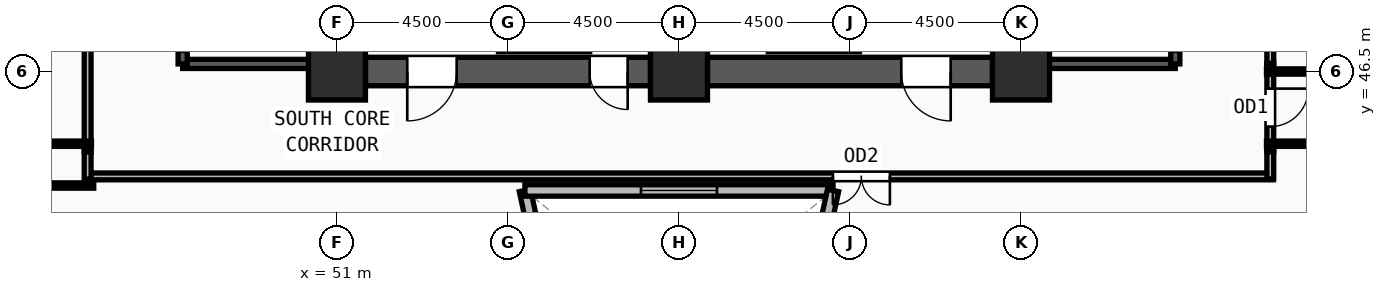
"""IFC4 building model, lengths in metres.
Left out: names, types, materials, properties, quantities, classifications, styles, units other than length and angle.
Written with IfcOpenShell. Run it as: python <this file> out.ifc"""

import sys

from ifc_helpers import new_model, si_unit, direction, frame, frame_2d, origin, origin_2d, place, context, subcontext, project, spatial, rectangle, extrude, source, transform, mapped, element, fill, save


model = new_model("IFC4")
c1 = context("Model", 3, precision=1e-05, world=origin(), true_north=direction((0.0, 1.0)))
c2 = subcontext(c1, "Body", "Model", "MODEL_VIEW")
j1 = project(units=[si_unit("LENGTHUNIT", "METRE"), si_unit("PLANEANGLEUNIT", "RADIAN")], contexts=[c1])
p1 = place(None, origin())
s1 = spatial("IfcSite", under=j1, at=p1, CompositionType="ELEMENT")
p2 = place(p1, origin())
s2 = spatial("IfcBuilding", under=s1, at=p2, CompositionType="ELEMENT")
p3 = place(p2, frame((0.0, 0.0, 135.75)))
s3 = spatial("IfcBuildingStorey", under=s2, at=p3, CompositionType="ELEMENT", Elevation=135.75)
m1 = source(origin(), c2, "Body", "SweptSolid", [
    extrude(rectangle(XDim=1.5, YDim=1.5, at=origin_2d()), origin(), (0.0, 0.0, 1.0), 3.75),
])
for number, where, z_axis, x_axis in (
    (1, (51.0, 46.5, 0.0), (0.0, 0.0, 1.0), (1.0, 0.0, 0.0)),
    (2, (60.0, 46.5, 0.0), (0.0, 0.0, 1.0), (1.0, 0.0, 0.0)),
    (3, (69.0, 46.5, 0.0), (0.0, 0.0, 1.0), (1.0, 0.0, 0.0)),
):
    element("IfcColumn", number, at=place(p3, frame(where, z_axis=z_axis, x_axis=x_axis)), inside=s3, PredefinedType="COLUMN", context=c2, shape_type="MappedRepresentation", body=[
        mapped(m1, transform((0.0, 0.0, 0.0), x_axis=(1.0, 0.0, 0.0), y_axis=(0.0, 1.0, 0.0), z_axis=(0.0, 0.0, 1.0), scale=1.0)),
    ])
p4 = place(p3, frame((66.25, 16.593, 0.0), z_axis=(0.0, 0.0, 1.0), x_axis=(0.550080155958, 0.835111861981, 0.0)))
e4 = element("IfcWall", 4, at=p4, inside=s3, PredefinedType="SOLIDWALL", context=c2, shape_type="SweptSolid", body=[
    extrude(rectangle(XDim=31.386, YDim=0.42, at=frame_2d((15.693, 0.0))), origin(), (0.0, 0.0, 1.0), 3.47),
])
m2 = source(origin(), c2, "Body", "SweptSolid", [
    extrude(rectangle(XDim=1.65, YDim=1.95, at=frame_2d((0.825, 0.975))), frame((0.0, 0.22, 0.0), z_axis=(0.0, -1.0, 0.0), x_axis=(1.0, 0.0, 0.0)), (0.0, 0.0, 1.0), 0.44),
])
p5 = place(p4, frame((7.022, 0.0, 0.55)))
e5 = element("IfcOpeningElement", 5, at=p5, cuts=e4, PredefinedType="OPENING", context=c2, shape_type="MappedRepresentation", body=[
    mapped(m2, transform((0.0, 0.0, 0.0), x_axis=(1.0, 0.0, 0.0), y_axis=(0.0, 1.0, 0.0), z_axis=(0.0, 0.0, 1.0), scale=1.0)),
])
p6 = place(p4, frame((14.868, 0.0, 0.55)))
e6 = element("IfcOpeningElement", 6, at=p6, cuts=e4, PredefinedType="OPENING", context=c2, shape_type="MappedRepresentation", body=[
    mapped(m2, transform((0.0, 0.0, 0.0), x_axis=(1.0, 0.0, 0.0), y_axis=(0.0, 1.0, 0.0), z_axis=(0.0, 0.0, 1.0), scale=1.0)),
])
p7 = place(p4, frame((22.715, 0.0, 0.55)))
e7 = element("IfcOpeningElement", 7, at=p7, cuts=e4, PredefinedType="OPENING", context=c2, shape_type="MappedRepresentation", body=[
    mapped(m2, transform((0.0, 0.0, 0.0), x_axis=(1.0, 0.0, 0.0), y_axis=(0.0, 1.0, 0.0), z_axis=(0.0, 0.0, 1.0), scale=1.0)),
])
p8 = place(p3, frame((68.25, 46.5, 0.0), z_axis=(0.0, 0.0, 1.0), x_axis=(-1.0, 0.0, 0.0)))
e8 = element("IfcWall", 8, at=p8, inside=s3, PredefinedType="SHEAR", context=c2, shape_type="SweptSolid", body=[
    extrude(rectangle(XDim=7.5, YDim=0.75, at=frame_2d((3.75, 0.0))), origin(), (0.0, 0.0, 1.0), 3.47),
])
m3 = source(origin(), c2, "Body", "SweptSolid", [
    extrude(rectangle(XDim=1.3, YDim=2.2, at=frame_2d((0.65, 1.1))), frame((0.0, 0.385, 0.0), z_axis=(0.0, -1.0, 0.0), x_axis=(1.0, 0.0, 0.0)), (0.0, 0.0, 1.0), 0.77),
])
p9 = place(p8, frame((1.1, 0.0, 0.0)))
e9 = element("IfcOpeningElement", 9, at=p9, cuts=e8, PredefinedType="OPENING", context=c2, shape_type="MappedRepresentation", body=[
    mapped(m3, transform((0.0, 0.0, 0.0), x_axis=(1.0, 0.0, 0.0), y_axis=(0.0, 1.0, 0.0), z_axis=(0.0, 0.0, 1.0), scale=1.0)),
])
p10 = place(p3, frame((59.25, 46.5, 0.0), z_axis=(0.0, 0.0, 1.0), x_axis=(-1.0, 0.0, 0.0)))
e10 = element("IfcWall", 10, at=p10, inside=s3, PredefinedType="SHEAR", context=c2, shape_type="SweptSolid", body=[
    extrude(rectangle(XDim=7.5, YDim=0.75, at=frame_2d((3.75, 0.0))), origin(), (0.0, 0.0, 1.0), 3.47),
])
p11 = place(p10, frame((5.1, 0.0, 0.0)))
e11 = element("IfcOpeningElement", 11, at=p11, cuts=e10, PredefinedType="OPENING", context=c2, shape_type="MappedRepresentation", body=[
    mapped(m3, transform((0.0, 0.0, 0.0), x_axis=(1.0, 0.0, 0.0), y_axis=(0.0, 1.0, 0.0), z_axis=(0.0, 0.0, 1.0), scale=1.0)),
])
m4 = source(origin(), c2, "Body", "SweptSolid", [
    extrude(rectangle(XDim=1.0, YDim=2.2, at=frame_2d((0.5, 1.1))), frame((0.0, 0.385, 0.0), z_axis=(0.0, -1.0, 0.0), x_axis=(1.0, 0.0, 0.0)), (0.0, 0.0, 1.0), 0.77),
])
p12 = place(p10, frame((0.6, 0.0, 0.0)))
e12 = element("IfcOpeningElement", 12, at=p12, cuts=e10, PredefinedType="OPENING", context=c2, shape_type="MappedRepresentation", body=[
    mapped(m4, transform((0.0, 0.0, 0.0), x_axis=(1.0, 0.0, 0.0), y_axis=(0.0, 1.0, 0.0), z_axis=(0.0, 0.0, 1.0), scale=1.0)),
])
p13 = place(p3, frame((46.94, 46.7, 0.0), z_axis=(0.0, 0.0, 1.0), x_axis=(1.0, 0.0, 0.0)))
e13 = element("IfcWall", 13, at=p13, inside=s3, PredefinedType="SOLIDWALL", context=c2, shape_type="SweptSolid", body=[
    extrude(rectangle(XDim=3.44, YDim=0.24, at=frame_2d((1.72, 0.0))), origin(), (0.0, 0.0, 1.0), 3.47),
])
p14 = place(p3, frame((50.38, 46.7, 0.0), z_axis=(0.0, 0.0, 1.0), x_axis=(0.0, 1.0, 0.0)))
e14 = element("IfcWall", 14, at=p14, inside=s3, PredefinedType="SOLIDWALL", context=c2, shape_type="SweptSolid", body=[
    extrude(rectangle(XDim=7.82, YDim=0.24, at=frame_2d((3.91, 0.0))), origin(), (0.0, 0.0, 1.0), 3.47),
])
p15 = place(p3, frame((46.94, 54.52, 0.0), z_axis=(0.0, 0.0, 1.0), x_axis=(0.0, -1.0, 0.0)))
e15 = element("IfcWall", 15, at=p15, inside=s3, PredefinedType="SOLIDWALL", context=c2, shape_type="SweptSolid", body=[
    extrude(rectangle(XDim=7.82, YDim=0.24, at=frame_2d((3.91, 0.0))), origin(), (0.0, 0.0, 1.0), 3.47),
])
m5 = source(origin(), c2, "Body", "SweptSolid", [
    extrude(rectangle(XDim=1.2, YDim=2.2, at=frame_2d((0.6, 1.1))), frame((0.0, 0.13, 0.0), z_axis=(0.0, -1.0, 0.0), x_axis=(1.0, 0.0, 0.0)), (0.0, 0.0, 1.0), 0.26),
])
p16 = place(p15, frame((6.3, 0.0, 0.0)))
e16 = element("IfcOpeningElement", 16, at=p16, cuts=e15, PredefinedType="OPENING", context=c2, shape_type="MappedRepresentation", body=[
    mapped(m5, transform((0.0, 0.0, 0.0), x_axis=(1.0, 0.0, 0.0), y_axis=(0.0, 1.0, 0.0), z_axis=(0.0, 0.0, 1.0), scale=1.0)),
])
p17 = place(p3, frame((69.62, 46.7, 0.0), z_axis=(0.0, 0.0, 1.0), x_axis=(1.0, 0.0, 0.0)))
e17 = element("IfcWall", 17, at=p17, inside=s3, PredefinedType="SOLIDWALL", context=c2, shape_type="SweptSolid", body=[
    extrude(rectangle(XDim=3.44, YDim=0.24, at=frame_2d((1.72, 0.0))), origin(), (0.0, 0.0, 1.0), 3.47),
])
p18 = place(p3, frame((73.06, 46.7, 0.0), z_axis=(0.0, 0.0, 1.0), x_axis=(0.0, 1.0, 0.0)))
e18 = element("IfcWall", 18, at=p18, inside=s3, PredefinedType="SOLIDWALL", context=c2, shape_type="SweptSolid", body=[
    extrude(rectangle(XDim=7.82, YDim=0.24, at=frame_2d((3.91, 0.0))), origin(), (0.0, 0.0, 1.0), 3.47),
])
p19 = place(p18, frame((0.32, 0.0, 0.0)))
e19 = element("IfcOpeningElement", 19, at=p19, cuts=e18, PredefinedType="OPENING", context=c2, shape_type="MappedRepresentation", body=[
    mapped(m5, transform((0.0, 0.0, 0.0), x_axis=(1.0, 0.0, 0.0), y_axis=(0.0, 1.0, 0.0), z_axis=(0.0, 0.0, 1.0), scale=1.0)),
])
p20 = place(p3, frame((69.62, 54.52, 0.0), z_axis=(0.0, 0.0, 1.0), x_axis=(0.0, -1.0, 0.0)))
e20 = element("IfcWall", 20, at=p20, inside=s3, PredefinedType="SOLIDWALL", context=c2, shape_type="SweptSolid", body=[
    extrude(rectangle(XDim=7.82, YDim=0.24, at=frame_2d((3.91, 0.0))), origin(), (0.0, 0.0, 1.0), 3.47),
])
p21 = place(p3, frame((57.365, 36.808, 0.0), z_axis=(0.0, 0.0, 1.0), x_axis=(-0.211351571183, 0.977410105001, 0.0)))
e21 = element("IfcWall", 21, at=p21, inside=s3, PredefinedType="SOLIDWALL", context=c2, shape_type="SweptSolid", body=[
    extrude(rectangle(XDim=6.714, YDim=0.3, at=frame_2d((3.357, 0.0))), origin(), (0.0, 0.0, 1.0), 3.47),
])
m6 = source(origin(), c2, "Body", "SweptSolid", [
    extrude(rectangle(XDim=2.0, YDim=1.9, at=frame_2d((1.0, 0.95))), frame((0.0, 0.16, 0.0), z_axis=(0.0, -1.0, 0.0), x_axis=(1.0, 0.0, 0.0)), (0.0, 0.0, 1.0), 0.32),
])
p22 = place(p21, frame((2.357, 0.0, 0.55)))
e22 = element("IfcOpeningElement", 22, at=p22, cuts=e21, PredefinedType="OPENING", context=c2, shape_type="MappedRepresentation", body=[
    mapped(m6, transform((0.0, 0.0, 0.0), x_axis=(1.0, 0.0, 0.0), y_axis=(0.0, 1.0, 0.0), z_axis=(0.0, 0.0, 1.0), scale=1.0)),
])
p23 = place(p3, frame((55.946, 43.37, 0.0), z_axis=(0.0, 0.0, 1.0), x_axis=(1.0, 0.0, 0.0)))
e23 = element("IfcWall", 23, at=p23, inside=s3, PredefinedType="SOLIDWALL", context=c2, shape_type="SweptSolid", body=[
    extrude(rectangle(XDim=8.108, YDim=0.3, at=frame_2d((4.054, 0.0))), origin(), (0.0, 0.0, 1.0), 3.47),
])
p24 = place(p23, frame((3.054, 0.0, 0.55)))
e24 = element("IfcOpeningElement", 24, at=p24, cuts=e23, PredefinedType="OPENING", context=c2, shape_type="MappedRepresentation", body=[
    mapped(m6, transform((0.0, 0.0, 0.0), x_axis=(1.0, 0.0, 0.0), y_axis=(0.0, 1.0, 0.0), z_axis=(0.0, 0.0, 1.0), scale=1.0)),
])
p25 = place(p3, frame((64.054, 43.37, 0.0), z_axis=(0.0, 0.0, 1.0), x_axis=(-0.211351571183, -0.977410105001, 0.0)))
e25 = element("IfcWall", 25, at=p25, inside=s3, PredefinedType="SOLIDWALL", context=c2, shape_type="SweptSolid", body=[
    extrude(rectangle(XDim=6.714, YDim=0.3, at=frame_2d((3.357, 0.0))), origin(), (0.0, 0.0, 1.0), 3.47),
])
p26 = place(p25, frame((2.357, 0.0, 0.55)))
e26 = element("IfcOpeningElement", 26, at=p26, cuts=e25, PredefinedType="OPENING", context=c2, shape_type="MappedRepresentation", body=[
    mapped(m6, transform((0.0, 0.0, 0.0), x_axis=(1.0, 0.0, 0.0), y_axis=(0.0, 1.0, 0.0), z_axis=(0.0, 0.0, 1.0), scale=1.0)),
])
p27 = place(p3, frame((44.44, 44.385, 0.0), z_axis=(0.0, 0.0, 1.0), x_axis=(0.0, 1.0, 0.0)))
e27 = element("IfcWall", 27, at=p27, inside=s3, PredefinedType="PARTITIONING", context=c2, shape_type="SweptSolid", body=[
    extrude(rectangle(XDim=6.83, YDim=0.18, at=frame_2d((3.415, 0.0))), origin(), (0.0, 0.0, 1.0), 3.47),
])
m7 = source(origin(), c2, "Body", "SweptSolid", [
    extrude(rectangle(XDim=1.0, YDim=2.2, at=frame_2d((0.5, 1.1))), frame((0.0, 0.1, 0.0), z_axis=(0.0, -1.0, 0.0), x_axis=(1.0, 0.0, 0.0)), (0.0, 0.0, 1.0), 0.2),
])
p28 = place(p27, frame((2.915, 0.0, 0.0)))
e28 = element("IfcOpeningElement", 28, at=p28, cuts=e27, PredefinedType="OPENING", context=c2, shape_type="MappedRepresentation", body=[
    mapped(m7, transform((0.0, 0.0, 0.0), x_axis=(1.0, 0.0, 0.0), y_axis=(0.0, 1.0, 0.0), z_axis=(0.0, 0.0, 1.0), scale=1.0)),
])
p29 = place(p3, frame((75.63, 43.74, 0.0), z_axis=(0.0, 0.0, 1.0), x_axis=(-1.0, 0.0, 0.0)))
e29 = element("IfcWall", 29, at=p29, inside=s3, PredefinedType="PARTITIONING", context=c2, shape_type="SweptSolid", body=[
    extrude(rectangle(XDim=31.26, YDim=0.18, at=frame_2d((15.63, 0.0))), origin(), (0.0, 0.0, 1.0), 3.47),
])
m8 = source(origin(), c2, "Body", "SweptSolid", [
    extrude(rectangle(XDim=1.5, YDim=2.2, at=frame_2d((0.75, 1.1))), frame((0.0, 0.1, 0.0), z_axis=(0.0, -1.0, 0.0), x_axis=(1.0, 0.0, 0.0)), (0.0, 0.0, 1.0), 0.2),
])
p30 = place(p29, frame((10.08, 0.0, 0.0)))
e30 = element("IfcOpeningElement", 30, at=p30, cuts=e29, PredefinedType="OPENING", context=c2, shape_type="MappedRepresentation", body=[
    mapped(m8, transform((0.0, 0.0, 0.0), x_axis=(1.0, 0.0, 0.0), y_axis=(0.0, 1.0, 0.0), z_axis=(0.0, 0.0, 1.0), scale=1.0)),
])
p31 = place(p3, frame((75.56, 46.715, 0.0), z_axis=(0.0, 0.0, 1.0), x_axis=(0.0, -1.0, 0.0)))
e31 = element("IfcWall", 31, at=p31, inside=s3, PredefinedType="PARTITIONING", context=c2, shape_type="SweptSolid", body=[
    extrude(rectangle(XDim=2.33, YDim=0.18, at=frame_2d((1.165, 0.0))), origin(), (0.0, 0.0, 1.0), 3.055),
])
p32 = place(p31, frame((0.665, 0.0, 0.0)))
e32 = element("IfcOpeningElement", 32, at=p32, cuts=e31, PredefinedType="OPENING", context=c2, shape_type="MappedRepresentation", body=[
    mapped(m7, transform((0.0, 0.0, 0.0), x_axis=(1.0, 0.0, 0.0), y_axis=(0.0, 1.0, 0.0), z_axis=(0.0, 0.0, 1.0), scale=1.0)),
])
for number, where, z_axis, x_axis in (
    (33, (44.44, 43.67, 0.0), (0.0, 0.0, 1.0), (0.0, 1.0, 0.0)),
    (34, (75.56, 44.385, 0.0), (0.0, 0.0, 1.0), (0.0, -1.0, 0.0)),
):
    element("IfcWall", number, at=place(p3, frame(where, z_axis=z_axis, x_axis=x_axis)), inside=s3, PredefinedType="PARTITIONING", context=c2, shape_type="SweptSolid", body=[
        extrude(rectangle(XDim=0.715, YDim=0.18, at=frame_2d((0.357, 0.0))), origin(), (0.0, 0.0, 1.0), 3.47),
    ])
p33 = place(p3, frame((75.56, 54.01, 0.0), z_axis=(0.0, 0.0, 1.0), x_axis=(0.0, -1.0, 0.0)))
e35 = element("IfcWall", 35, at=p33, inside=s3, PredefinedType="PARTITIONING", context=c2, shape_type="SweptSolid", body=[
    extrude(rectangle(XDim=7.295, YDim=0.18, at=frame_2d((3.647, 0.0))), origin(), (0.0, 0.0, 1.0), 3.47),
])
p34 = place(p3, frame((44.6, 43.5, 0.0), z_axis=(0.0, 0.0, 1.0), x_axis=(-1.0, 0.0, 0.0)))
e36 = element("IfcWall", 36, at=p34, inside=s3, PredefinedType="PARTITIONING", context=c2, shape_type="SweptSolid", body=[
    extrude(rectangle(XDim=8.898, YDim=0.14, at=frame_2d((4.449, 0.0))), origin(), (0.0, 0.0, 1.0), 3.47),
])
p35 = place(p3, frame((44.54, 44.6, 0.0), z_axis=(0.0, 0.0, 1.0), x_axis=(-1.0, 0.0, 0.0)))
e37 = element("IfcWall", 37, at=p35, inside=s3, PredefinedType="PARTITIONING", context=c2, shape_type="SweptSolid", body=[
    extrude(rectangle(XDim=9.39, YDim=0.14, at=frame_2d((4.695, 0.0))), origin(), (0.0, 0.0, 1.0), 3.47),
])
p36 = place(p3, frame((75.46, 44.6, 0.0), z_axis=(0.0, 0.0, 1.0), x_axis=(1.0, 0.0, 0.0)))
e38 = element("IfcWall", 38, at=p36, inside=s3, PredefinedType="PARTITIONING", context=c2, shape_type="SweptSolid", body=[
    extrude(rectangle(XDim=9.73, YDim=0.14, at=frame_2d((4.865, 0.0))), origin(), (0.0, 0.0, 1.0), 3.47),
])
p37 = place(p3, frame((75.46, 46.5, 0.0), z_axis=(0.0, 0.0, 1.0), x_axis=(1.0, 0.0, 0.0)))
e39 = element("IfcWall", 39, at=p37, inside=s3, PredefinedType="PARTITIONING", context=c2, shape_type="SweptSolid", body=[
    extrude(rectangle(XDim=10.655, YDim=0.14, at=frame_2d((5.328, 0.0))), origin(), (0.0, 0.0, 1.0), 3.47),
])
m9 = source(origin(), c2, "Body", "SweptSolid", [
    extrude(rectangle(XDim=1.3, YDim=2.2, at=frame_2d((0.65, 1.1))), frame((0.0, 0.025, 0.0), z_axis=(0.0, -1.0, 0.0), x_axis=(1.0, 0.0, 0.0)), (0.0, 0.0, 1.0), 0.05),
])
p38 = place(p11, origin())
e40 = element("IfcDoor", 40, at=p38, inside=s3, OperationType="SINGLE_SWING_RIGHT", PredefinedType="DOOR", context=c2, shape_type="MappedRepresentation", body=[
    mapped(m9, transform((0.0, 0.0, 0.0), x_axis=(1.0, 0.0, 0.0), y_axis=(0.0, 1.0, 0.0), z_axis=(0.0, 0.0, 1.0), scale=1.0)),
])
fill(e11, e40)
m10 = source(origin(), c2, "Body", "SweptSolid", [
    extrude(rectangle(XDim=1.0, YDim=2.2, at=frame_2d((0.5, 1.1))), frame((0.0, 0.025, 0.0), z_axis=(0.0, -1.0, 0.0), x_axis=(1.0, 0.0, 0.0)), (0.0, 0.0, 1.0), 0.05),
])
p39 = place(p12, origin())
e41 = element("IfcDoor", 41, at=p39, inside=s3, OperationType="SINGLE_SWING_LEFT", PredefinedType="DOOR", context=c2, shape_type="MappedRepresentation", body=[
    mapped(m10, transform((0.0, 0.0, 0.0), x_axis=(1.0, 0.0, 0.0), y_axis=(0.0, 1.0, 0.0), z_axis=(0.0, 0.0, 1.0), scale=1.0)),
])
fill(e12, e41)
p40 = place(p9, origin())
e42 = element("IfcDoor", 42, at=p40, inside=s3, OperationType="SINGLE_SWING_LEFT", PredefinedType="DOOR", context=c2, shape_type="MappedRepresentation", body=[
    mapped(m9, transform((0.0, 0.0, 0.0), x_axis=(1.0, 0.0, 0.0), y_axis=(0.0, 1.0, 0.0), z_axis=(0.0, 0.0, 1.0), scale=1.0)),
])
fill(e9, e42)
m11 = source(origin(), c2, "Body", "SweptSolid", [
    extrude(rectangle(XDim=2.0, YDim=1.9, at=frame_2d((1.0, 0.95))), frame((0.0, 0.03, 0.0), z_axis=(0.0, -1.0, 0.0), x_axis=(1.0, 0.0, 0.0)), (0.0, 0.0, 1.0), 0.06),
])
p41 = place(p24, origin())
e43 = element("IfcWindow", 43, at=p41, inside=s3, PartitioningType="DOUBLE_PANEL_VERTICAL", PredefinedType="WINDOW", context=c2, shape_type="MappedRepresentation", body=[
    mapped(m11, transform((0.0, 0.0, 0.0), x_axis=(1.0, 0.0, 0.0), y_axis=(0.0, 1.0, 0.0), z_axis=(0.0, 0.0, 1.0), scale=1.0)),
])
fill(e24, e43)
m12 = source(origin(), c2, "Body", "SweptSolid", [
    extrude(rectangle(XDim=1.5, YDim=2.2, at=frame_2d((0.75, 1.1))), frame((0.0, 0.025, 0.0), z_axis=(0.0, -1.0, 0.0), x_axis=(1.0, 0.0, 0.0)), (0.0, 0.0, 1.0), 0.05),
])
p42 = place(p30, origin())
e44 = element("IfcDoor", 44, at=p42, inside=s3, OperationType="DOUBLE_DOOR_SINGLE_SWING", PredefinedType="DOOR", context=c2, shape_type="MappedRepresentation", body=[
    mapped(m12, transform((0.0, 0.0, 0.0), x_axis=(1.0, 0.0, 0.0), y_axis=(0.0, 1.0, 0.0), z_axis=(0.0, 0.0, 1.0), scale=1.0)),
])
fill(e30, e44)
p43 = place(p32, origin())
e45 = element("IfcDoor", 45, at=p43, inside=s3, OperationType="SINGLE_SWING_LEFT", PredefinedType="DOOR", context=c2, shape_type="MappedRepresentation", body=[
    mapped(m10, transform((0.0, 0.0, 0.0), x_axis=(1.0, 0.0, 0.0), y_axis=(0.0, 1.0, 0.0), z_axis=(0.0, 0.0, 1.0), scale=1.0)),
])
fill(e32, e45)
save(model, sys.argv[1])
